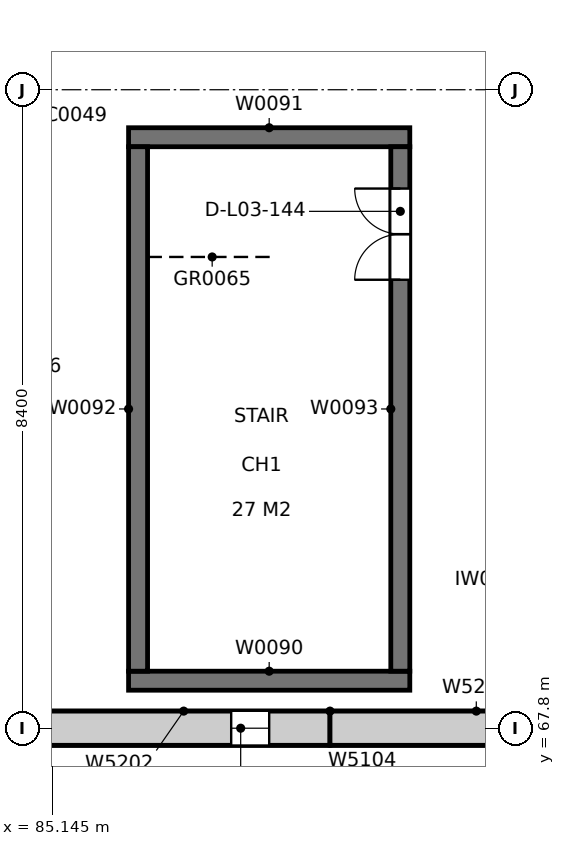
"""IFC4 building model, lengths in metres.
Left out: names, types, materials, properties, quantities, classifications, styles, units other than length and angle.
Written with IfcOpenShell. Run it as: python <this file> out.ifc"""

import sys

from ifc_helpers import new_model, si_unit, direction, frame, frame_2d, origin, place, context, subcontext, project, spatial, rectangle, extrude, element, fill, save


model = new_model("IFC4")
c1 = context("Model", 3, precision=1e-05, world=origin(), true_north=direction((0.0, 1.0)))
c2 = subcontext(c1, "Body", "Model", "MODEL_VIEW")
j1 = project(units=[si_unit("LENGTHUNIT", "METRE"), si_unit("PLANEANGLEUNIT", "RADIAN")], contexts=[c1])
p1 = place(None, origin())
s1 = spatial("IfcSite", under=j1, at=p1, CompositionType="ELEMENT")
p2 = place(p1, origin())
s2 = spatial("IfcBuilding", under=s1, at=p2, CompositionType="ELEMENT")
p3 = place(p2, frame((0.0, 0.0, 14.4)))
s3 = spatial("IfcBuildingStorey", under=s2, at=p3, CompositionType="ELEMENT", Elevation=14.4)
for number, where, z_axis, x_axis in (
    (1, (86.15, 68.425, 0.0), (0.0, 0.0, 1.0), (1.0, 0.0, 0.0)),
    (2, (86.15, 75.575, 0.0), (0.0, 0.0, 1.0), (1.0, 0.0, 0.0)),
):
    element("IfcWall", number, at=place(p3, frame(where, z_axis=z_axis, x_axis=x_axis)), inside=s3, PredefinedType="SOLIDWALL", context=c2, shape_type="SweptSolid", body=[
        extrude(rectangle(XDim=3.7, YDim=0.25, at=frame_2d((1.85, 0.0))), origin(), (0.0, 0.0, 1.0), 4.8),
    ])
p4 = place(p3, frame((86.275, 68.55, 0.0), z_axis=(0.0, 0.0, 1.0), x_axis=(0.0, 1.0, 0.0)))
e3 = element("IfcWall", 3, at=p4, inside=s3, PredefinedType="SOLIDWALL", context=c2, shape_type="SweptSolid", body=[
    extrude(rectangle(XDim=6.9, YDim=0.25, at=frame_2d((3.45, 0.0))), origin(), (0.0, 0.0, 1.0), 4.8),
])
p5 = place(p3, frame((89.725, 68.55, 0.0), z_axis=(0.0, 0.0, 1.0), x_axis=(0.0, 1.0, 0.0)))
e4 = element("IfcWall", 4, at=p5, inside=s3, PredefinedType="SOLIDWALL", context=c2, shape_type="SweptSolid", body=[
    extrude(rectangle(XDim=6.9, YDim=0.25, at=frame_2d((3.45, 0.0))), origin(), (0.0, 0.0, 1.0), 4.8),
])
p6 = place(p5, frame((5.15, 0.0, 0.0)))
e5 = element("IfcOpeningElement", 5, at=p6, cuts=e4, PredefinedType="OPENING", context=c2, shape_type="SweptSolid", body=[
    extrude(rectangle(XDim=1.2, YDim=2.1, at=frame_2d((0.6, 1.05))), frame((0.0, 0.135, 0.0), z_axis=(0.0, -1.0, 0.0), x_axis=(1.0, 0.0, 0.0)), (0.0, 0.0, 1.0), 0.27),
])
p7 = place(p3, frame((84.95, 67.8, 0.0), z_axis=(0.0, 0.0, 1.0), x_axis=(1.0, 0.0, 0.0)))
e6 = element("IfcWall", 6, at=p7, inside=s3, PredefinedType="SOLIDWALL", context=c2, shape_type="SweptSolid", body=[
    extrude(rectangle(XDim=7.7, YDim=0.45, at=frame_2d((3.85, 0.0))), origin(), (0.0, 0.0, 1.0), 3.9),
])
p8 = place(p7, frame((2.55, 0.0, 0.9)))
e7 = element("IfcOpeningElement", 7, at=p8, cuts=e6, PredefinedType="OPENING", context=c2, shape_type="SweptSolid", body=[
    extrude(rectangle(XDim=0.5, YDim=2.1, at=frame_2d((0.25, 1.05))), frame((0.0, 0.235, 0.0), z_axis=(0.0, -1.0, 0.0), x_axis=(1.0, 0.0, 0.0)), (0.0, 0.0, 1.0), 0.47),
])
p9 = place(p7, frame((6.875, 0.0, 2.1)))
e8 = element("IfcOpeningElement", 8, at=p9, cuts=e6, PredefinedType="OPENING", context=c2, shape_type="SweptSolid", body=[
    extrude(rectangle(XDim=0.6, YDim=0.9, at=frame_2d((0.3, 0.45))), frame((0.0, 0.235, 0.0), z_axis=(0.0, -1.0, 0.0), x_axis=(1.0, 0.0, 0.0)), (0.0, 0.0, 1.0), 0.47),
])
p10 = place(p3, frame((84.95, 67.8, 3.9), z_axis=(0.0, 0.0, 1.0), x_axis=(1.0, 0.0, 0.0)))
e9 = element("IfcWall", 9, at=p10, inside=s3, PredefinedType="SOLIDWALL", context=c2, shape_type="SweptSolid", body=[
    extrude(rectangle(XDim=3.85, YDim=0.45, at=frame_2d((1.925, 0.0))), origin(), (0.0, 0.0, 1.0), 4.964),
])
p11 = place(p3, frame((88.8, 67.8, 3.9), z_axis=(0.0, 0.0, 1.0), x_axis=(1.0, 0.0, 0.0)))
e10 = element("IfcWall", 10, at=p11, inside=s3, PredefinedType="SOLIDWALL", context=c2, shape_type="SweptSolid", body=[
    extrude(rectangle(XDim=3.85, YDim=0.45, at=frame_2d((1.925, 0.0))), origin(), (0.0, 0.0, 1.0), 0.115),
])
p12 = place(p6, origin())
e11 = element("IfcDoor", 11, at=p12, inside=s3, OperationType="DOUBLE_DOOR_SINGLE_SWING", PredefinedType="DOOR", context=c2, shape_type="SweptSolid", body=[
    extrude(rectangle(XDim=1.2, YDim=2.1, at=frame_2d((0.6, 1.05))), frame((0.0, 0.025, 0.0), z_axis=(0.0, -1.0, 0.0), x_axis=(1.0, 0.0, 0.0)), (0.0, 0.0, 1.0), 0.05),
])
fill(e5, e11)
p13 = place(p8, origin())
e12 = element("IfcWindow", 12, at=p13, inside=s3, PartitioningType="SINGLE_PANEL", PredefinedType="WINDOW", context=c2, shape_type="SweptSolid", body=[
    extrude(rectangle(XDim=0.5, YDim=2.1, at=frame_2d((0.25, 1.05))), frame((0.0, 0.085, 0.0), z_axis=(0.0, -1.0, 0.0), x_axis=(1.0, 0.0, 0.0)), (0.0, 0.0, 1.0), 0.06),
])
fill(e7, e12)
save(model, sys.argv[1])
